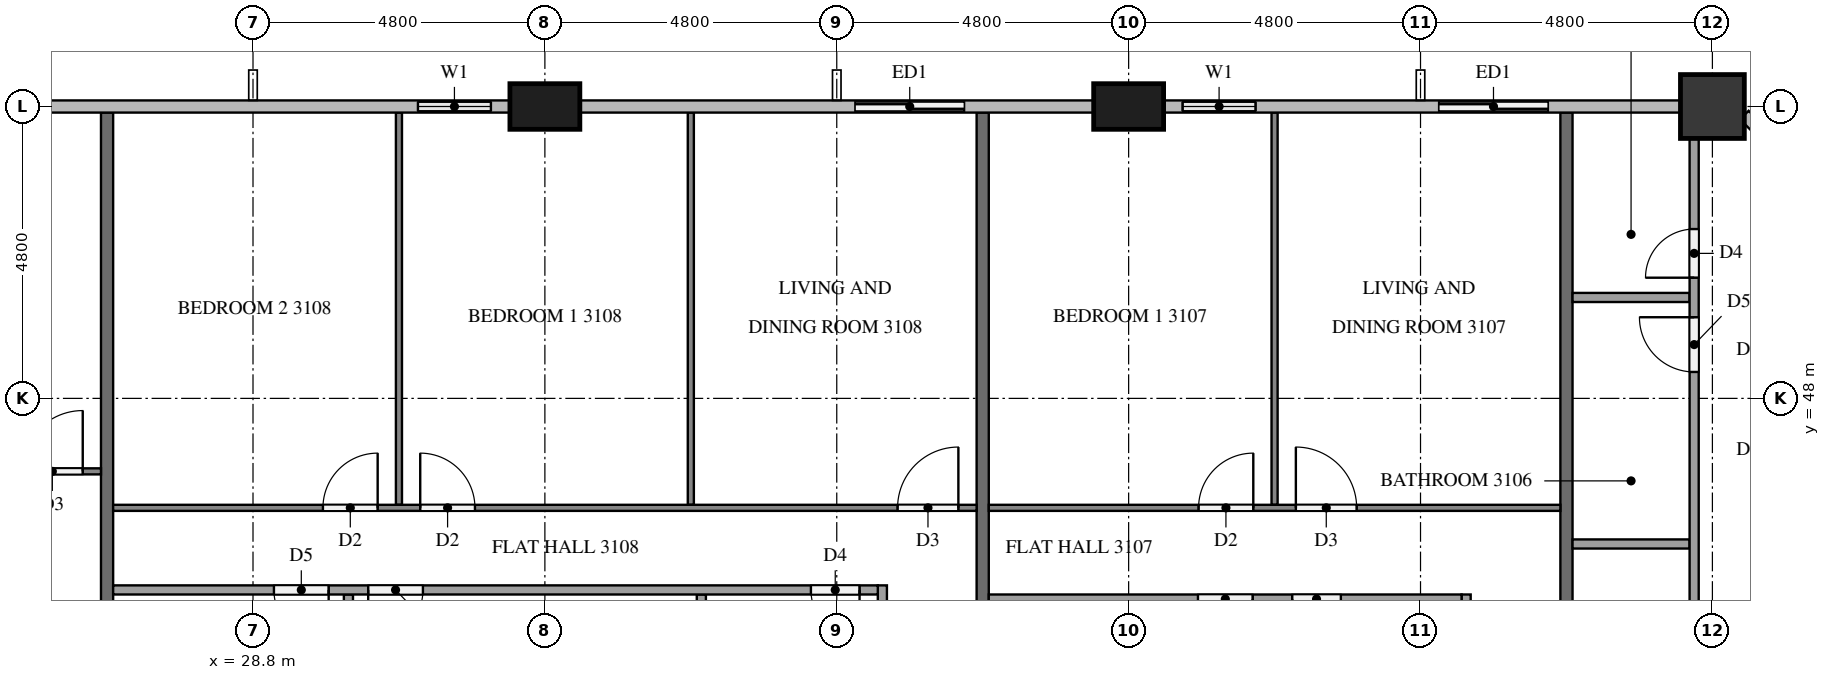
"""IFC4 building model, lengths in metres.
Left out: names, types, materials, properties, quantities, classifications, styles, units other than length and angle.
Written with IfcOpenShell. Run it as: python <this file> out.ifc"""

import sys

from ifc_helpers import new_model, si_unit, direction, frame, frame_2d, origin, origin_2d, place, context, subcontext, project, spatial, rectangle, extrude, element, fill, save


model = new_model("IFC4")
c1 = context("Model", 3, precision=1e-05, world=origin(), true_north=direction((0.0, 1.0)))
c2 = subcontext(c1, "Body", "Model", "MODEL_VIEW")
j1 = project(units=[si_unit("LENGTHUNIT", "METRE"), si_unit("PLANEANGLEUNIT", "RADIAN")], contexts=[c1])
p1 = place(None, origin())
s1 = spatial("IfcSite", under=j1, at=p1, CompositionType="ELEMENT")
p2 = place(p1, origin())
s2 = spatial("IfcBuilding", under=s1, at=p2, CompositionType="ELEMENT")
p3 = place(p2, frame((0.0, 0.0, 122.6)))
s3 = spatial("IfcBuildingStorey", under=s2, at=p3, CompositionType="ELEMENT", Elevation=122.6)
p4 = place(p3, frame((52.8, 52.8, 0.0), z_axis=(0.0, 0.0, 1.0), x_axis=(1.0, 0.0, 0.0)))
e1 = element("IfcColumn", 1, at=p4, inside=s3, PredefinedType="COLUMN", context=c2, shape_type="SweptSolid", body=[
    extrude(rectangle(XDim=1.05, YDim=1.05, at=origin_2d()), origin(), (0.0, 0.0, 1.0), 3.2),
])
for number, where, z_axis, x_axis in (
    (2, (43.2, 52.8, 0.0), (0.0, 0.0, 1.0), (1.0, 0.0, 0.0)),
    (3, (33.6, 52.8, 0.0), (0.0, 0.0, 1.0), (1.0, 0.0, 0.0)),
):
    element("IfcColumn", number, at=place(p3, frame(where, z_axis=z_axis, x_axis=x_axis)), inside=s3, PredefinedType="COLUMN", context=c2, shape_type="SweptSolid", body=[
        extrude(rectangle(XDim=1.15, YDim=0.75, at=origin_2d()), origin(), (0.0, 0.0, 1.0), 3.2),
    ])
p5 = place(p3, frame((50.4, 52.8, 0.0), z_axis=(0.0, 0.0, 1.0), x_axis=(-1.0, 0.0, 0.0)))
e4 = element("IfcWall", 4, at=p5, inside=s3, PredefinedType="SOLIDWALL", context=c2, shape_type="SweptSolid", body=[
    extrude(rectangle(XDim=2.4, YDim=0.15, at=frame_2d((1.2, 0.0))), origin(), (0.0, 0.0, 1.0), 3.2),
])
p6 = place(p5, frame((0.3, 0.0, 0.0)))
e5 = element("IfcOpeningElement", 5, at=p6, cuts=e4, PredefinedType="OPENING", context=c2, shape_type="SweptSolid", body=[
    extrude(rectangle(XDim=1.8, YDim=2.4, at=frame_2d((0.9, 1.2))), frame((0.0, 0.085, 0.0), z_axis=(0.0, -1.0, 0.0), x_axis=(1.0, 0.0, 0.0)), (0.0, 0.0, 1.0), 0.17),
])
p7 = place(p3, frame((45.6, 52.8, 0.0), z_axis=(0.0, 0.0, 1.0), x_axis=(-1.0, 0.0, 0.0)))
e6 = element("IfcWall", 6, at=p7, inside=s3, PredefinedType="SOLIDWALL", context=c2, shape_type="SweptSolid", body=[
    extrude(rectangle(XDim=1.825, YDim=0.15, at=frame_2d((0.913, 0.0))), origin(), (0.0, 0.0, 1.0), 3.2),
])
p8 = place(p7, frame((0.312, 0.0, 0.9)))
e7 = element("IfcOpeningElement", 7, at=p8, cuts=e6, PredefinedType="OPENING", context=c2, shape_type="SweptSolid", body=[
    extrude(rectangle(XDim=1.2, YDim=1.4, at=frame_2d((0.6, 0.7))), frame((0.0, 0.085, 0.0), z_axis=(0.0, -1.0, 0.0), x_axis=(1.0, 0.0, 0.0)), (0.0, 0.0, 1.0), 0.17),
])
p9 = place(p3, frame((40.8, 52.8, 0.0), z_axis=(0.0, 0.0, 1.0), x_axis=(-1.0, 0.0, 0.0)))
e8 = element("IfcWall", 8, at=p9, inside=s3, PredefinedType="SOLIDWALL", context=c2, shape_type="SweptSolid", body=[
    extrude(rectangle(XDim=2.4, YDim=0.15, at=frame_2d((1.2, 0.0))), origin(), (0.0, 0.0, 1.0), 3.2),
])
p10 = place(p9, frame((0.3, 0.0, 0.0)))
e9 = element("IfcOpeningElement", 9, at=p10, cuts=e8, PredefinedType="OPENING", context=c2, shape_type="SweptSolid", body=[
    extrude(rectangle(XDim=1.8, YDim=2.4, at=frame_2d((0.9, 1.2))), frame((0.0, 0.085, 0.0), z_axis=(0.0, -1.0, 0.0), x_axis=(1.0, 0.0, 0.0)), (0.0, 0.0, 1.0), 0.17),
])
p11 = place(p3, frame((33.025, 52.8, 0.0), z_axis=(0.0, 0.0, 1.0), x_axis=(-1.0, 0.0, 0.0)))
e10 = element("IfcWall", 10, at=p11, inside=s3, PredefinedType="SOLIDWALL", context=c2, shape_type="SweptSolid", body=[
    extrude(rectangle(XDim=1.825, YDim=0.15, at=frame_2d((0.913, 0.0))), origin(), (0.0, 0.0, 1.0), 3.2),
])
p12 = place(p11, frame((0.312, 0.0, 0.9)))
e11 = element("IfcOpeningElement", 11, at=p12, cuts=e10, PredefinedType="OPENING", context=c2, shape_type="SweptSolid", body=[
    extrude(rectangle(XDim=1.2, YDim=1.4, at=frame_2d((0.6, 0.7))), frame((0.0, 0.085, 0.0), z_axis=(0.0, -1.0, 0.0), x_axis=(1.0, 0.0, 0.0)), (0.0, 0.0, 1.0), 0.17),
])
for number, where, z_axis, x_axis in (
    (12, (50.4, 40.9, 0.0), (0.0, 0.0, 1.0), (0.0, 1.0, 0.0)),
    (13, (40.8, 52.7, 0.0), (0.0, 0.0, 1.0), (0.0, -1.0, 0.0)),
    (14, (26.4, 52.7, 0.0), (0.0, 0.0, 1.0), (0.0, -1.0, 0.0)),
):
    element("IfcWall", number, at=place(p3, frame(where, z_axis=z_axis, x_axis=x_axis)), inside=s3, PredefinedType="PARTITIONING", context=c2, shape_type="SweptSolid", body=[
        extrude(rectangle(XDim=11.8, YDim=0.2, at=frame_2d((5.9, 0.0))), origin(), (0.0, 0.0, 1.0), 3.2),
    ])
for number, where, z_axis, x_axis in (
    (15, (50.5, 45.606, 0.0), (0.0, 0.0, 1.0), (1.0, 0.0, 0.0)),
    (16, (50.5, 49.66, 0.0), (0.0, 0.0, 1.0), (1.0, 0.0, 0.0)),
):
    element("IfcWall", number, at=place(p3, frame(where, z_axis=z_axis, x_axis=x_axis)), inside=s3, PredefinedType="PARTITIONING", context=c2, shape_type="SweptSolid", body=[
        extrude(rectangle(XDim=1.925, YDim=0.15, at=frame_2d((0.962, 0.0))), origin(), (0.0, 0.0, 1.0), 3.2),
    ])
p13 = place(p3, frame((52.5, 39.525, 0.0), z_axis=(0.0, 0.0, 1.0), x_axis=(0.0, 1.0, 0.0)))
e17 = element("IfcWall", 17, at=p13, inside=s3, PredefinedType="PARTITIONING", context=c2, shape_type="SweptSolid", body=[
    extrude(rectangle(XDim=12.75, YDim=0.15, at=frame_2d((6.375, 0.0))), origin(), (0.0, 0.0, 1.0), 3.2),
])
p14 = place(p13, frame((0.3, 0.0, 0.0)))
e18 = element("IfcOpeningElement", 18, at=p14, cuts=e17, PredefinedType="OPENING", context=c2, shape_type="SweptSolid", body=[
    extrude(rectangle(XDim=0.9, YDim=2.1, at=frame_2d((0.45, 1.05))), frame((0.0, 0.085, 0.0), z_axis=(0.0, -1.0, 0.0), x_axis=(1.0, 0.0, 0.0)), (0.0, 0.0, 1.0), 0.17),
])
p15 = place(p13, frame((8.91, 0.0, 0.0)))
e19 = element("IfcOpeningElement", 19, at=p15, cuts=e17, PredefinedType="OPENING", context=c2, shape_type="SweptSolid", body=[
    extrude(rectangle(XDim=0.9, YDim=2.1, at=frame_2d((0.45, 1.05))), frame((0.0, 0.085, 0.0), z_axis=(0.0, -1.0, 0.0), x_axis=(1.0, 0.0, 0.0)), (0.0, 0.0, 1.0), 0.17),
])
p16 = place(p13, frame((10.46, 0.0, 0.0)))
e20 = element("IfcOpeningElement", 20, at=p16, cuts=e17, PredefinedType="OPENING", context=c2, shape_type="SweptSolid", body=[
    extrude(rectangle(XDim=0.8, YDim=2.1, at=frame_2d((0.4, 1.05))), frame((0.0, 0.085, 0.0), z_axis=(0.0, -1.0, 0.0), x_axis=(1.0, 0.0, 0.0)), (0.0, 0.0, 1.0), 0.17),
])
p17 = place(p3, frame((45.6, 46.25, 0.0), z_axis=(0.0, 0.0, 1.0), x_axis=(0.0, 1.0, 0.0)))
e21 = element("IfcWall", 21, at=p17, inside=s3, PredefinedType="PARTITIONING", context=c2, shape_type="SweptSolid", body=[
    extrude(rectangle(XDim=6.45, YDim=0.1, at=frame_2d((3.225, 0.0))), origin(), (0.0, 0.0, 1.0), 3.2),
])
p18 = place(p3, frame((40.9, 46.2, 0.0), z_axis=(0.0, 0.0, 1.0), x_axis=(1.0, 0.0, 0.0)))
e22 = element("IfcWall", 22, at=p18, inside=s3, PredefinedType="PARTITIONING", context=c2, shape_type="SweptSolid", body=[
    extrude(rectangle(XDim=9.4, YDim=0.1, at=frame_2d((4.7, 0.0))), origin(), (0.0, 0.0, 1.0), 3.2),
])
p19 = place(p18, frame((5.05, 0.0, 0.0)))
e23 = element("IfcOpeningElement", 23, at=p19, cuts=e22, PredefinedType="OPENING", context=c2, shape_type="SweptSolid", body=[
    extrude(rectangle(XDim=1.0, YDim=2.1, at=frame_2d((0.5, 1.05))), frame((0.0, 0.06, 0.0), z_axis=(0.0, -1.0, 0.0), x_axis=(1.0, 0.0, 0.0)), (0.0, 0.0, 1.0), 0.12),
])
p20 = place(p18, frame((3.45, 0.0, 0.0)))
e24 = element("IfcOpeningElement", 24, at=p20, cuts=e22, PredefinedType="OPENING", context=c2, shape_type="SweptSolid", body=[
    extrude(rectangle(XDim=0.9, YDim=2.1, at=frame_2d((0.45, 1.05))), frame((0.0, 0.06, 0.0), z_axis=(0.0, -1.0, 0.0), x_axis=(1.0, 0.0, 0.0)), (0.0, 0.0, 1.0), 0.12),
])
p21 = place(p3, frame((48.75, 40.9, 0.0), z_axis=(0.0, 0.0, 1.0), x_axis=(0.0, 1.0, 0.0)))
e25 = element("IfcWall", 25, at=p21, inside=s3, PredefinedType="PARTITIONING", context=c2, shape_type="SweptSolid", body=[
    extrude(rectangle(XDim=3.875, YDim=0.15, at=frame_2d((1.938, 0.0))), origin(), (0.0, 0.0, 1.0), 3.2),
])
p22 = place(p3, frame((48.675, 44.7, 0.0), z_axis=(0.0, 0.0, 1.0), x_axis=(-1.0, 0.0, 0.0)))
e26 = element("IfcWall", 26, at=p22, inside=s3, PredefinedType="PARTITIONING", context=c2, shape_type="SweptSolid", body=[
    extrude(rectangle(XDim=7.775, YDim=0.15, at=frame_2d((3.888, 0.0))), origin(), (0.0, 0.0, 1.0), 3.2),
])
p23 = place(p22, frame((1.985, 0.0, 0.0)))
e27 = element("IfcOpeningElement", 27, at=p23, cuts=e26, PredefinedType="OPENING", context=c2, shape_type="SweptSolid", body=[
    extrude(rectangle(XDim=0.8, YDim=2.1, at=frame_2d((0.4, 1.05))), frame((0.0, 0.085, 0.0), z_axis=(0.0, -1.0, 0.0), x_axis=(1.0, 0.0, 0.0)), (0.0, 0.0, 1.0), 0.17),
])
p24 = place(p22, frame((3.435, 0.0, 0.0)))
e28 = element("IfcOpeningElement", 28, at=p24, cuts=e26, PredefinedType="OPENING", context=c2, shape_type="SweptSolid", body=[
    extrude(rectangle(XDim=0.9, YDim=2.1, at=frame_2d((0.45, 1.05))), frame((0.0, 0.085, 0.0), z_axis=(0.0, -1.0, 0.0), x_axis=(1.0, 0.0, 0.0)), (0.0, 0.0, 1.0), 0.17),
])
for number, where, z_axis, x_axis in (
    (29, (36.0, 46.25, 0.0), (0.0, 0.0, 1.0), (0.0, 1.0, 0.0)),
    (30, (31.2, 46.25, 0.0), (0.0, 0.0, 1.0), (0.0, 1.0, 0.0)),
):
    element("IfcWall", number, at=place(p3, frame(where, z_axis=z_axis, x_axis=x_axis)), inside=s3, PredefinedType="PARTITIONING", context=c2, shape_type="SweptSolid", body=[
        extrude(rectangle(XDim=6.45, YDim=0.1, at=frame_2d((3.225, 0.0))), origin(), (0.0, 0.0, 1.0), 3.2),
    ])
p25 = place(p3, frame((26.5, 46.2, 0.0), z_axis=(0.0, 0.0, 1.0), x_axis=(1.0, 0.0, 0.0)))
e31 = element("IfcWall", 31, at=p25, inside=s3, PredefinedType="PARTITIONING", context=c2, shape_type="SweptSolid", body=[
    extrude(rectangle(XDim=14.2, YDim=0.1, at=frame_2d((7.1, 0.0))), origin(), (0.0, 0.0, 1.0), 3.2),
])
p26 = place(p25, frame((12.9, 0.0, 0.0)))
e32 = element("IfcOpeningElement", 32, at=p26, cuts=e31, PredefinedType="OPENING", context=c2, shape_type="SweptSolid", body=[
    extrude(rectangle(XDim=1.0, YDim=2.1, at=frame_2d((0.5, 1.05))), frame((0.0, 0.06, 0.0), z_axis=(0.0, -1.0, 0.0), x_axis=(1.0, 0.0, 0.0)), (0.0, 0.0, 1.0), 0.12),
])
p27 = place(p25, frame((5.05, 0.0, 0.0)))
e33 = element("IfcOpeningElement", 33, at=p27, cuts=e31, PredefinedType="OPENING", context=c2, shape_type="SweptSolid", body=[
    extrude(rectangle(XDim=0.9, YDim=2.1, at=frame_2d((0.45, 1.05))), frame((0.0, 0.06, 0.0), z_axis=(0.0, -1.0, 0.0), x_axis=(1.0, 0.0, 0.0)), (0.0, 0.0, 1.0), 0.12),
])
p28 = place(p25, frame((3.45, 0.0, 0.0)))
e34 = element("IfcOpeningElement", 34, at=p28, cuts=e31, PredefinedType="OPENING", context=c2, shape_type="SweptSolid", body=[
    extrude(rectangle(XDim=0.9, YDim=2.1, at=frame_2d((0.45, 1.05))), frame((0.0, 0.06, 0.0), z_axis=(0.0, -1.0, 0.0), x_axis=(1.0, 0.0, 0.0)), (0.0, 0.0, 1.0), 0.12),
])
for number, where, z_axis, x_axis in (
    (35, (36.173, 40.9, 0.0), (0.0, 0.0, 1.0), (0.0, 1.0, 0.0)),
    (36, (30.369, 40.9, 0.0), (0.0, 0.0, 1.0), (0.0, 1.0, 0.0)),
):
    element("IfcWall", number, at=place(p3, frame(where, z_axis=z_axis, x_axis=x_axis)), inside=s3, PredefinedType="PARTITIONING", context=c2, shape_type="SweptSolid", body=[
        extrude(rectangle(XDim=3.875, YDim=0.15, at=frame_2d((1.938, 0.0))), origin(), (0.0, 0.0, 1.0), 3.2),
    ])
p29 = place(p3, frame((39.15, 40.9, 0.0), z_axis=(0.0, 0.0, 1.0), x_axis=(0.0, 1.0, 0.0)))
e37 = element("IfcWall", 37, at=p29, inside=s3, PredefinedType="PARTITIONING", context=c2, shape_type="SweptSolid", body=[
    extrude(rectangle(XDim=4.025, YDim=0.15, at=frame_2d((2.013, 0.0))), origin(), (0.0, 0.0, 1.0), 3.2),
])
p30 = place(p3, frame((39.075, 44.85, 0.0), z_axis=(0.0, 0.0, 1.0), x_axis=(-1.0, 0.0, 0.0)))
e38 = element("IfcWall", 38, at=p30, inside=s3, PredefinedType="PARTITIONING", context=c2, shape_type="SweptSolid", body=[
    extrude(rectangle(XDim=12.575, YDim=0.15, at=frame_2d((6.288, 0.0))), origin(), (0.0, 0.0, 1.0), 3.2),
])
p31 = place(p30, frame((0.3, 0.0, 0.0)))
e39 = element("IfcOpeningElement", 39, at=p31, cuts=e38, PredefinedType="OPENING", context=c2, shape_type="SweptSolid", body=[
    extrude(rectangle(XDim=0.8, YDim=2.1, at=frame_2d((0.4, 1.05))), frame((0.0, 0.085, 0.0), z_axis=(0.0, -1.0, 0.0), x_axis=(1.0, 0.0, 0.0)), (0.0, 0.0, 1.0), 0.17),
])
p32 = place(p30, frame((7.481, 0.0, 0.0)))
e40 = element("IfcOpeningElement", 40, at=p32, cuts=e38, PredefinedType="OPENING", context=c2, shape_type="SweptSolid", body=[
    extrude(rectangle(XDim=0.9, YDim=2.1, at=frame_2d((0.45, 1.05))), frame((0.0, 0.085, 0.0), z_axis=(0.0, -1.0, 0.0), x_axis=(1.0, 0.0, 0.0)), (0.0, 0.0, 1.0), 0.17),
])
p33 = place(p30, frame((9.031, 0.0, 0.0)))
e41 = element("IfcOpeningElement", 41, at=p33, cuts=e38, PredefinedType="OPENING", context=c2, shape_type="SweptSolid", body=[
    extrude(rectangle(XDim=0.9, YDim=2.1, at=frame_2d((0.45, 1.05))), frame((0.0, 0.085, 0.0), z_axis=(0.0, -1.0, 0.0), x_axis=(1.0, 0.0, 0.0)), (0.0, 0.0, 1.0), 0.17),
])
p34 = place(p3, frame((12.1, 46.8, 0.0), z_axis=(0.0, 0.0, 1.0), x_axis=(1.0, 0.0, 0.0)))
e42 = element("IfcWall", 42, at=p34, inside=s3, PredefinedType="PARTITIONING", context=c2, shape_type="SweptSolid", body=[
    extrude(rectangle(XDim=14.2, YDim=0.1, at=frame_2d((7.1, 0.0))), origin(), (0.0, 0.0, 1.0), 3.2),
])
p35 = place(p34, frame((12.9, 0.0, 0.0)))
e43 = element("IfcOpeningElement", 43, at=p35, cuts=e42, PredefinedType="OPENING", context=c2, shape_type="SweptSolid", body=[
    extrude(rectangle(XDim=1.0, YDim=2.1, at=frame_2d((0.5, 1.05))), frame((0.0, 0.06, 0.0), z_axis=(0.0, -1.0, 0.0), x_axis=(1.0, 0.0, 0.0)), (0.0, 0.0, 1.0), 0.12),
])
p36 = place(p34, frame((5.05, 0.0, 0.0)))
e44 = element("IfcOpeningElement", 44, at=p36, cuts=e42, PredefinedType="OPENING", context=c2, shape_type="SweptSolid", body=[
    extrude(rectangle(XDim=0.9, YDim=2.1, at=frame_2d((0.45, 1.05))), frame((0.0, 0.06, 0.0), z_axis=(0.0, -1.0, 0.0), x_axis=(1.0, 0.0, 0.0)), (0.0, 0.0, 1.0), 0.12),
])
p37 = place(p34, frame((3.45, 0.0, 0.0)))
e45 = element("IfcOpeningElement", 45, at=p37, cuts=e42, PredefinedType="OPENING", context=c2, shape_type="SweptSolid", body=[
    extrude(rectangle(XDim=0.9, YDim=2.1, at=frame_2d((0.45, 1.05))), frame((0.0, 0.06, 0.0), z_axis=(0.0, -1.0, 0.0), x_axis=(1.0, 0.0, 0.0)), (0.0, 0.0, 1.0), 0.12),
])
p38 = place(p6, origin())
e46 = element("IfcDoor", 46, at=p38, inside=s3, OperationType="SLIDING_TO_LEFT", PredefinedType="DOOR", context=c2, shape_type="SweptSolid", body=[
    extrude(rectangle(XDim=1.8, YDim=2.4, at=frame_2d((0.9, 1.2))), frame((0.0, 0.025, 0.0), z_axis=(0.0, -1.0, 0.0), x_axis=(1.0, 0.0, 0.0)), (0.0, 0.0, 1.0), 0.05),
])
fill(e5, e46)
p39 = place(p8, origin())
e47 = element("IfcWindow", 47, at=p39, inside=s3, PartitioningType="SINGLE_PANEL", PredefinedType="WINDOW", context=c2, shape_type="SweptSolid", body=[
    extrude(rectangle(XDim=1.2, YDim=1.4, at=frame_2d((0.6, 0.7))), frame((0.0, 0.03, 0.0), z_axis=(0.0, -1.0, 0.0), x_axis=(1.0, 0.0, 0.0)), (0.0, 0.0, 1.0), 0.06),
])
fill(e7, e47)
p40 = place(p10, origin())
e48 = element("IfcDoor", 48, at=p40, inside=s3, OperationType="SLIDING_TO_RIGHT", PredefinedType="DOOR", context=c2, shape_type="SweptSolid", body=[
    extrude(rectangle(XDim=1.8, YDim=2.4, at=frame_2d((0.9, 1.2))), frame((0.0, 0.025, 0.0), z_axis=(0.0, -1.0, 0.0), x_axis=(1.0, 0.0, 0.0)), (0.0, 0.0, 1.0), 0.05),
])
fill(e9, e48)
p41 = place(p12, origin())
e49 = element("IfcWindow", 49, at=p41, inside=s3, PartitioningType="SINGLE_PANEL", PredefinedType="WINDOW", context=c2, shape_type="SweptSolid", body=[
    extrude(rectangle(XDim=1.2, YDim=1.4, at=frame_2d((0.6, 0.7))), frame((0.0, 0.03, 0.0), z_axis=(0.0, -1.0, 0.0), x_axis=(1.0, 0.0, 0.0)), (0.0, 0.0, 1.0), 0.06),
])
fill(e11, e49)
p42 = place(p15, origin())
e50 = element("IfcDoor", 50, at=p42, inside=s3, OperationType="SINGLE_SWING_RIGHT", PredefinedType="DOOR", context=c2, shape_type="SweptSolid", body=[
    extrude(rectangle(XDim=0.9, YDim=2.1, at=frame_2d((0.45, 1.05))), frame((0.0, 0.025, 0.0), z_axis=(0.0, -1.0, 0.0), x_axis=(1.0, 0.0, 0.0)), (0.0, 0.0, 1.0), 0.05),
])
fill(e19, e50)
p43 = place(p16, origin())
e51 = element("IfcDoor", 51, at=p43, inside=s3, OperationType="SINGLE_SWING_LEFT", PredefinedType="DOOR", context=c2, shape_type="SweptSolid", body=[
    extrude(rectangle(XDim=0.8, YDim=2.1, at=frame_2d((0.4, 1.05))), frame((0.0, 0.025, 0.0), z_axis=(0.0, -1.0, 0.0), x_axis=(1.0, 0.0, 0.0)), (0.0, 0.0, 1.0), 0.05),
])
fill(e20, e51)
p44 = place(p19, origin())
e52 = element("IfcDoor", 52, at=p44, inside=s3, OperationType="SINGLE_SWING_LEFT", PredefinedType="DOOR", context=c2, shape_type="SweptSolid", body=[
    extrude(rectangle(XDim=1.0, YDim=2.1, at=frame_2d((0.5, 1.05))), frame((0.0, 0.025, 0.0), z_axis=(0.0, -1.0, 0.0), x_axis=(1.0, 0.0, 0.0)), (0.0, 0.0, 1.0), 0.05),
])
fill(e23, e52)
p45 = place(p20, origin())
e53 = element("IfcDoor", 53, at=p45, inside=s3, OperationType="SINGLE_SWING_RIGHT", PredefinedType="DOOR", context=c2, shape_type="SweptSolid", body=[
    extrude(rectangle(XDim=0.9, YDim=2.1, at=frame_2d((0.45, 1.05))), frame((0.0, 0.025, 0.0), z_axis=(0.0, -1.0, 0.0), x_axis=(1.0, 0.0, 0.0)), (0.0, 0.0, 1.0), 0.05),
])
fill(e24, e53)
p46 = place(p23, origin())
e54 = element("IfcDoor", 54, at=p46, inside=s3, OperationType="SINGLE_SWING_RIGHT", PredefinedType="DOOR", context=c2, shape_type="SweptSolid", body=[
    extrude(rectangle(XDim=0.8, YDim=2.1, at=frame_2d((0.4, 1.05))), frame((0.0, 0.025, 0.0), z_axis=(0.0, -1.0, 0.0), x_axis=(1.0, 0.0, 0.0)), (0.0, 0.0, 1.0), 0.05),
])
fill(e27, e54)
p47 = place(p24, origin())
e55 = element("IfcDoor", 55, at=p47, inside=s3, OperationType="SINGLE_SWING_LEFT", PredefinedType="DOOR", context=c2, shape_type="SweptSolid", body=[
    extrude(rectangle(XDim=0.9, YDim=2.1, at=frame_2d((0.45, 1.05))), frame((0.0, 0.025, 0.0), z_axis=(0.0, -1.0, 0.0), x_axis=(1.0, 0.0, 0.0)), (0.0, 0.0, 1.0), 0.05),
])
fill(e28, e55)
p48 = place(p26, origin())
e56 = element("IfcDoor", 56, at=p48, inside=s3, OperationType="SINGLE_SWING_RIGHT", PredefinedType="DOOR", context=c2, shape_type="SweptSolid", body=[
    extrude(rectangle(XDim=1.0, YDim=2.1, at=frame_2d((0.5, 1.05))), frame((0.0, 0.025, 0.0), z_axis=(0.0, -1.0, 0.0), x_axis=(1.0, 0.0, 0.0)), (0.0, 0.0, 1.0), 0.05),
])
fill(e32, e56)
p49 = place(p27, origin())
e57 = element("IfcDoor", 57, at=p49, inside=s3, OperationType="SINGLE_SWING_LEFT", PredefinedType="DOOR", context=c2, shape_type="SweptSolid", body=[
    extrude(rectangle(XDim=0.9, YDim=2.1, at=frame_2d((0.45, 1.05))), frame((0.0, 0.025, 0.0), z_axis=(0.0, -1.0, 0.0), x_axis=(1.0, 0.0, 0.0)), (0.0, 0.0, 1.0), 0.05),
])
fill(e33, e57)
p50 = place(p28, origin())
e58 = element("IfcDoor", 58, at=p50, inside=s3, OperationType="SINGLE_SWING_RIGHT", PredefinedType="DOOR", context=c2, shape_type="SweptSolid", body=[
    extrude(rectangle(XDim=0.9, YDim=2.1, at=frame_2d((0.45, 1.05))), frame((0.0, 0.025, 0.0), z_axis=(0.0, -1.0, 0.0), x_axis=(1.0, 0.0, 0.0)), (0.0, 0.0, 1.0), 0.05),
])
fill(e34, e58)
p51 = place(p31, origin())
e59 = element("IfcDoor", 59, at=p51, inside=s3, OperationType="SINGLE_SWING_LEFT", PredefinedType="DOOR", context=c2, shape_type="SweptSolid", body=[
    extrude(rectangle(XDim=0.8, YDim=2.1, at=frame_2d((0.4, 1.05))), frame((0.0, 0.025, 0.0), z_axis=(0.0, -1.0, 0.0), x_axis=(1.0, 0.0, 0.0)), (0.0, 0.0, 1.0), 0.05),
])
fill(e39, e59)
p52 = place(p32, origin())
e60 = element("IfcDoor", 60, at=p52, inside=s3, OperationType="SINGLE_SWING_RIGHT", PredefinedType="DOOR", context=c2, shape_type="SweptSolid", body=[
    extrude(rectangle(XDim=0.9, YDim=2.1, at=frame_2d((0.45, 1.05))), frame((0.0, 0.025, 0.0), z_axis=(0.0, -1.0, 0.0), x_axis=(1.0, 0.0, 0.0)), (0.0, 0.0, 1.0), 0.05),
])
fill(e40, e60)
p53 = place(p33, origin())
e61 = element("IfcDoor", 61, at=p53, inside=s3, OperationType="SINGLE_SWING_LEFT", PredefinedType="DOOR", context=c2, shape_type="SweptSolid", body=[
    extrude(rectangle(XDim=0.9, YDim=2.1, at=frame_2d((0.45, 1.05))), frame((0.0, 0.025, 0.0), z_axis=(0.0, -1.0, 0.0), x_axis=(1.0, 0.0, 0.0)), (0.0, 0.0, 1.0), 0.05),
])
fill(e41, e61)
p54 = place(p35, origin())
e62 = element("IfcDoor", 62, at=p54, inside=s3, OperationType="SINGLE_SWING_RIGHT", PredefinedType="DOOR", context=c2, shape_type="SweptSolid", body=[
    extrude(rectangle(XDim=1.0, YDim=2.1, at=frame_2d((0.5, 1.05))), frame((0.0, 0.025, 0.0), z_axis=(0.0, -1.0, 0.0), x_axis=(1.0, 0.0, 0.0)), (0.0, 0.0, 1.0), 0.05),
])
fill(e43, e62)
save(model, sys.argv[1])
